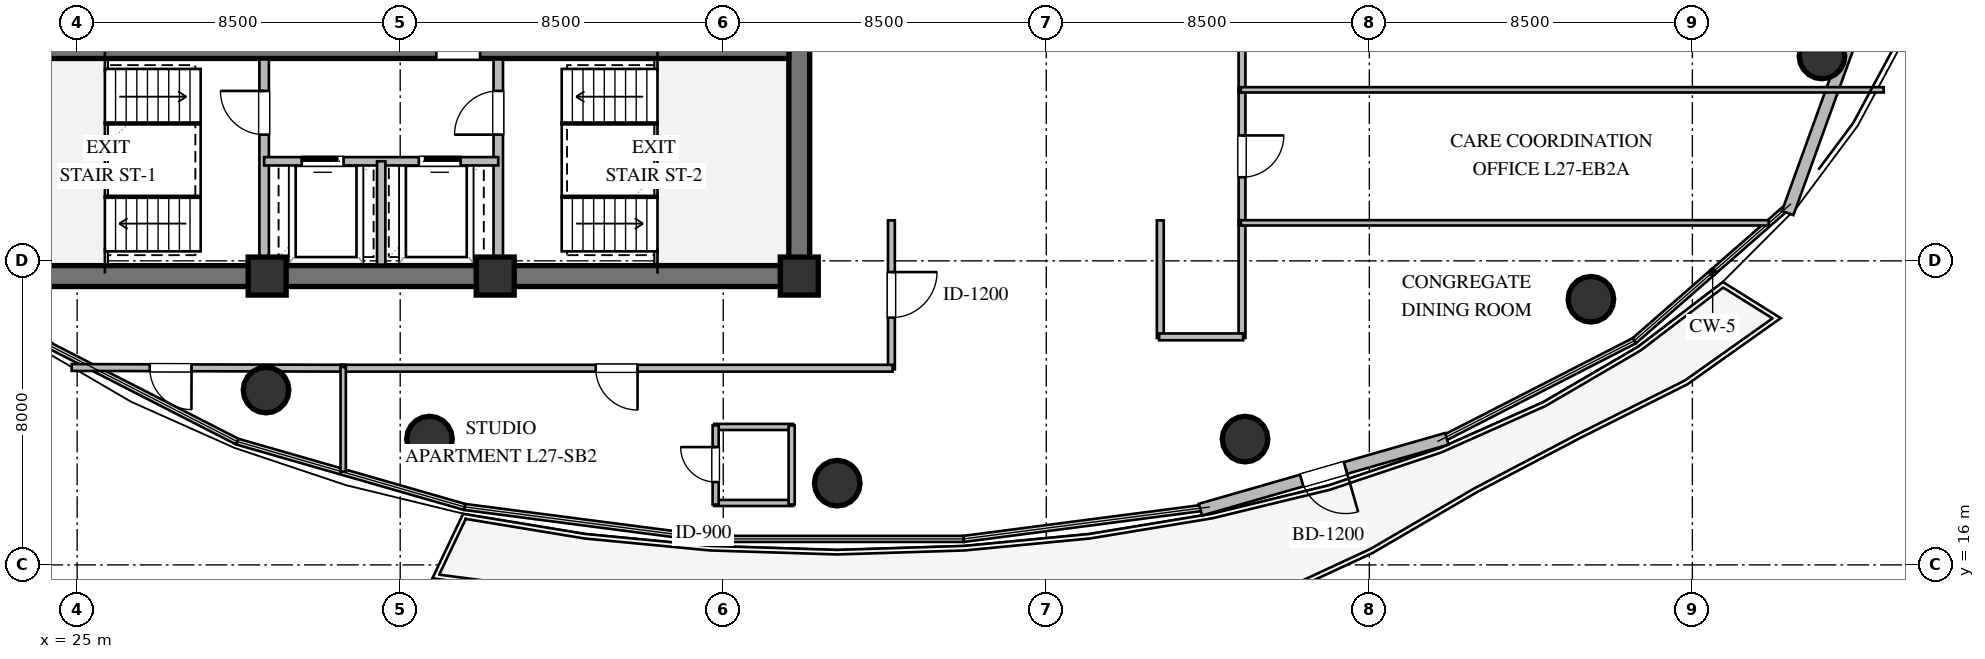
"""IFC4 building model, lengths in metres.
Left out: names, types, materials, properties, quantities, classifications, styles, units other than length and angle.
Written with IfcOpenShell. Run it as: python <this file> out.ifc"""

import sys

from ifc_helpers import new_model, si_unit, direction, frame, frame_2d, origin, origin_2d, place, context, subcontext, project, spatial, rectangle, circle, extrude, element, fill, save


model = new_model("IFC4")
c1 = context("Model", 3, precision=1e-05, world=origin(), true_north=direction((0.0, 1.0)))
c2 = subcontext(c1, "Body", "Model", "MODEL_VIEW")
j1 = project(units=[si_unit("LENGTHUNIT", "METRE"), si_unit("PLANEANGLEUNIT", "RADIAN")], contexts=[c1])
p1 = place(None, origin())
s1 = spatial("IfcSite", under=j1, at=p1, CompositionType="ELEMENT")
p2 = place(p1, origin())
s2 = spatial("IfcBuilding", under=s1, at=p2, CompositionType="ELEMENT")
p3 = place(p2, frame((0.0, 0.0, 106.2)))
s3 = spatial("IfcBuildingStorey", under=s2, at=p3, CompositionType="ELEMENT", Elevation=106.2)
p4 = place(p3, frame((21.725, 23.6, 0.0), z_axis=(0.0, 0.0, 1.0), x_axis=(1.0, 0.0, 0.0)))
e1 = element("IfcWall", 1, at=p4, inside=s3, PredefinedType="SHEAR", context=c2, shape_type="SweptSolid", body=[
    extrude(rectangle(XDim=22.55, YDim=0.55, at=frame_2d((11.275, 0.0))), origin(), (0.0, 0.0, 1.0), 3.36),
])
p5 = place(p3, frame((44.0, 23.875, 0.0), z_axis=(0.0, 0.0, 1.0), x_axis=(0.0, 1.0, 0.0)))
e2 = element("IfcWall", 2, at=p5, inside=s3, PredefinedType="SHEAR", context=c2, shape_type="SweptSolid", body=[
    extrude(rectangle(XDim=12.25, YDim=0.55, at=frame_2d((6.125, 0.0))), origin(), (0.0, 0.0, 1.0), 3.36),
])
p6 = place(p5, frame((8.725, 0.0, 0.0)))
e3 = element("IfcOpeningElement", 3, at=p6, cuts=e2, PredefinedType="OPENING", context=c2, shape_type="SweptSolid", body=[
    extrude(rectangle(XDim=1.5, YDim=2.15, at=frame_2d((0.75, 1.075))), frame((0.0, 0.285, 0.0), z_axis=(0.0, -1.0, 0.0), x_axis=(1.0, 0.0, 0.0)), (0.0, 0.0, 1.0), 0.57),
])
p7 = place(p3, frame((22.275, 29.6, 0.0), z_axis=(0.0, 0.0, 1.0), x_axis=(1.0, 0.0, 0.0)))
e4 = element("IfcWall", 4, at=p7, inside=s3, PredefinedType="SHEAR", context=c2, shape_type="SweptSolid", body=[
    extrude(rectangle(XDim=21.45, YDim=0.55, at=frame_2d((10.725, 0.0))), origin(), (0.0, 0.0, 1.0), 3.36),
])
p8 = place(p7, frame((12.175, 0.0, 0.0)))
e5 = element("IfcOpeningElement", 5, at=p8, cuts=e4, PredefinedType="OPENING", context=c2, shape_type="SweptSolid", body=[
    extrude(rectangle(XDim=1.15, YDim=2.1, at=frame_2d((0.575, 1.05))), frame((0.0, 0.285, 0.0), z_axis=(0.0, -1.0, 0.0), x_axis=(1.0, 0.0, 0.0)), (0.0, 0.0, 1.0), 0.57),
])
for number, where, z_axis, x_axis in (
    (6, (30.0, 23.6, 0.0), (0.0, 0.0, 1.0), (1.0, 0.0, 0.0)),
    (7, (36.0, 23.6, 0.0), (0.0, 0.0, 1.0), (1.0, 0.0, 0.0)),
    (8, (44.0, 23.6, 0.0), (0.0, 0.0, 1.0), (1.0, 0.0, 0.0)),
):
    element("IfcColumn", number, at=place(p3, frame(where, z_axis=z_axis, x_axis=x_axis)), inside=s3, PredefinedType="COLUMN", context=c2, shape_type="SweptSolid", body=[
        extrude(rectangle(XDim=1.0, YDim=1.0, at=origin_2d()), origin(), (0.0, 0.0, 1.0), 3.6),
    ])
for number, where, z_axis, x_axis in (
    (9, (29.97, 20.6, 0.0), (0.0, 0.0, 1.0), (1.0, 0.0, 0.0)),
    (10, (34.27, 19.31, 0.0), (0.0, 0.0, 1.0), (1.0, 0.0, 0.0)),
    (11, (45.0, 18.15, 0.0), (0.0, 0.0, 1.0), (1.0, 0.0, 0.0)),
    (12, (55.73, 19.31, 0.0), (0.0, 0.0, 1.0), (1.0, 0.0, 0.0)),
    (13, (64.83, 22.99, 0.0), (0.0, 0.0, 1.0), (1.0, 0.0, 0.0)),
    (14, (70.91, 29.39, 0.0), (0.0, 0.0, 1.0), (1.0, 0.0, 0.0)),
):
    element("IfcColumn", number, at=place(p3, frame(where, z_axis=z_axis, x_axis=x_axis)), inside=s3, PredefinedType="COLUMN", context=c2, shape_type="SweptSolid", body=[
        extrude(circle(Radius=0.6, at=origin_2d()), origin(), (0.0, 0.0, 1.0), 3.6),
    ])
p9 = place(p3, frame((74.708, 38.244, 0.0), z_axis=(0.0, 0.0, 1.0), x_axis=(-0.340324669139, -0.94030799187, 0.0)))
e15 = element("IfcWall", 15, at=p9, inside=s3, PredefinedType="STANDARD", context=c2, shape_type="SweptSolid", body=[
    extrude(rectangle(XDim=13.81, YDim=0.32, at=frame_2d((6.905, 0.0))), origin(), (0.0, 0.0, 1.0), 3.36),
])
p10 = place(p3, frame((61.039, 19.317, 0.0), z_axis=(0.0, 0.0, 1.0), x_axis=(-0.96106509915, -0.276322049784, 0.0)))
e16 = element("IfcWall", 16, at=p10, inside=s3, PredefinedType="STANDARD", context=c2, shape_type="SweptSolid", body=[
    extrude(rectangle(XDim=6.746, YDim=0.32, at=frame_2d((3.373, 0.0))), origin(), (0.0, 0.0, 1.0), 3.36),
])
p11 = place(p10, frame((2.773, 0.0, 0.0)))
e17 = element("IfcOpeningElement", 17, at=p11, cuts=e16, PredefinedType="OPENING", context=c2, shape_type="SweptSolid", body=[
    extrude(rectangle(XDim=1.2, YDim=2.15, at=frame_2d((0.6, 1.075))), frame((0.0, 0.17, 0.0), z_axis=(0.0, -1.0, 0.0), x_axis=(1.0, 0.0, 0.0)), (0.0, 0.0, 1.0), 0.34),
])
p12 = place(p3, frame((29.92, 23.9, 0.0), z_axis=(0.0, 0.0, 1.0), x_axis=(0.0, 1.0, 0.0)))
e18 = element("IfcWall", 18, at=p12, inside=s3, PredefinedType="SOLIDWALL", context=c2, shape_type="SweptSolid", body=[
    extrude(rectangle(XDim=5.4, YDim=0.25, at=frame_2d((2.7, 0.0))), origin(), (0.0, 0.0, 1.0), 2.89),
])
p13 = place(p12, frame((3.421, 0.0, 0.0)))
e19 = element("IfcOpeningElement", 19, at=p13, cuts=e18, PredefinedType="OPENING", context=c2, shape_type="SweptSolid", body=[
    extrude(rectangle(XDim=1.15, YDim=2.1, at=frame_2d((0.575, 1.05))), frame((0.0, 0.135, 0.0), z_axis=(0.0, -1.0, 0.0), x_axis=(1.0, 0.0, 0.0)), (0.0, 0.0, 1.0), 0.27),
])
p14 = place(p3, frame((36.08, 23.9, 0.0), z_axis=(0.0, 0.0, 1.0), x_axis=(0.0, 1.0, 0.0)))
e20 = element("IfcWall", 20, at=p14, inside=s3, PredefinedType="SOLIDWALL", context=c2, shape_type="SweptSolid", body=[
    extrude(rectangle(XDim=5.4, YDim=0.25, at=frame_2d((2.7, 0.0))), origin(), (0.0, 0.0, 1.0), 3.36),
])
p15 = place(p14, frame((3.421, 0.0, 0.0)))
e21 = element("IfcOpeningElement", 21, at=p15, cuts=e20, PredefinedType="OPENING", context=c2, shape_type="SweptSolid", body=[
    extrude(rectangle(XDim=1.15, YDim=2.1, at=frame_2d((0.575, 1.05))), frame((0.0, 0.135, 0.0), z_axis=(0.0, -1.0, 0.0), x_axis=(1.0, 0.0, 0.0)), (0.0, 0.0, 1.0), 0.27),
])
p16 = place(p3, frame((29.92, 26.62, 0.0), z_axis=(0.0, 0.0, 1.0), x_axis=(1.0, 0.0, 0.0)))
e22 = element("IfcWall", 22, at=p16, inside=s3, PredefinedType="SOLIDWALL", context=c2, shape_type="SweptSolid", body=[
    extrude(rectangle(XDim=6.16, YDim=0.22, at=frame_2d((3.08, 0.0))), origin(), (0.0, 0.0, 1.0), 3.36),
])
p17 = place(p16, frame((0.99, 0.0, 0.0)))
e23 = element("IfcOpeningElement", 23, at=p17, cuts=e22, PredefinedType="OPENING", context=c2, shape_type="SweptSolid", body=[
    extrude(rectangle(XDim=1.1, YDim=2.1, at=frame_2d((0.55, 1.05))), frame((0.0, 0.12, 0.0), z_axis=(0.0, -1.0, 0.0), x_axis=(1.0, 0.0, 0.0)), (0.0, 0.0, 1.0), 0.24),
])
p18 = place(p16, frame((4.07, 0.0, 0.0)))
e24 = element("IfcOpeningElement", 24, at=p18, cuts=e22, PredefinedType="OPENING", context=c2, shape_type="SweptSolid", body=[
    extrude(rectangle(XDim=1.1, YDim=2.1, at=frame_2d((0.55, 1.05))), frame((0.0, 0.12, 0.0), z_axis=(0.0, -1.0, 0.0), x_axis=(1.0, 0.0, 0.0)), (0.0, 0.0, 1.0), 0.24),
])
p19 = place(p3, frame((33.0, 23.9, 0.0), z_axis=(0.0, 0.0, 1.0), x_axis=(0.0, 1.0, 0.0)))
e25 = element("IfcWall", 25, at=p19, inside=s3, PredefinedType="SOLIDWALL", context=c2, shape_type="SweptSolid", body=[
    extrude(rectangle(XDim=2.72, YDim=0.22, at=frame_2d((1.36, 0.0))), origin(), (0.0, 0.0, 1.0), 3.36),
])
p20 = place(p3, frame((41.76, 17.63, 0.0), z_axis=(0.0, 0.0, 1.0), x_axis=(1.0, 0.0, 0.0)))
e26 = element("IfcWall", 26, at=p20, inside=s3, PredefinedType="PLUMBINGWALL", context=c2, shape_type="SweptSolid", body=[
    extrude(rectangle(XDim=2.08, YDim=0.16, at=frame_2d((1.04, 0.0))), origin(), (0.0, 0.0, 1.0), 2.657),
])
p21 = place(p3, frame((41.76, 19.63, 0.0), z_axis=(0.0, 0.0, 1.0), x_axis=(1.0, 0.0, 0.0)))
e27 = element("IfcWall", 27, at=p21, inside=s3, PredefinedType="PLUMBINGWALL", context=c2, shape_type="SweptSolid", body=[
    extrude(rectangle(XDim=2.08, YDim=0.16, at=frame_2d((1.04, 0.0))), origin(), (0.0, 0.0, 1.0), 3.36),
])
p22 = place(p3, frame((41.8, 17.59, 0.0), z_axis=(0.0, 0.0, 1.0), x_axis=(0.0, 1.0, 0.0)))
e28 = element("IfcWall", 28, at=p22, inside=s3, PredefinedType="PLUMBINGWALL", context=c2, shape_type="SweptSolid", body=[
    extrude(rectangle(XDim=2.08, YDim=0.16, at=frame_2d((1.04, 0.0))), origin(), (0.0, 0.0, 1.0), 3.36),
])
p23 = place(p22, frame((0.59, 0.0, 0.0)))
e29 = element("IfcOpeningElement", 29, at=p23, cuts=e28, PredefinedType="OPENING", context=c2, shape_type="SweptSolid", body=[
    extrude(rectangle(XDim=0.92, YDim=2.1, at=frame_2d((0.46, 1.05))), frame((0.0, 0.09, 0.0), z_axis=(0.0, -1.0, 0.0), x_axis=(1.0, 0.0, 0.0)), (0.0, 0.0, 1.0), 0.18),
])
p24 = place(p3, frame((43.8, 17.59, 0.0), z_axis=(0.0, 0.0, 1.0), x_axis=(0.0, 1.0, 0.0)))
e30 = element("IfcWall", 30, at=p24, inside=s3, PredefinedType="PLUMBINGWALL", context=c2, shape_type="SweptSolid", body=[
    extrude(rectangle(XDim=2.08, YDim=0.16, at=frame_2d((1.04, 0.0))), origin(), (0.0, 0.0, 1.0), 3.36),
])
p25 = place(p3, frame((46.425, 25.065, 0.0), z_axis=(0.0, 0.0, 1.0), x_axis=(0.0, -1.0, 0.0)))
e31 = element("IfcWall", 31, at=p25, inside=s3, PredefinedType="PARTITIONING", context=c2, shape_type="SweptSolid", body=[
    extrude(rectangle(XDim=3.92, YDim=0.18, at=frame_2d((1.96, 0.0))), origin(), (0.0, 0.0, 1.0), 3.36),
])
p26 = place(p25, frame((1.36, 0.0, 0.0)))
e32 = element("IfcOpeningElement", 32, at=p26, cuts=e31, PredefinedType="OPENING", context=c2, shape_type="SweptSolid", body=[
    extrude(rectangle(XDim=1.2, YDim=2.15, at=frame_2d((0.6, 1.075))), frame((0.0, 0.1, 0.0), z_axis=(0.0, -1.0, 0.0), x_axis=(1.0, 0.0, 0.0)), (0.0, 0.0, 1.0), 0.2),
])
for number, where, z_axis, x_axis in (
    (33, (55.65, 25.065, 0.0), (0.0, 0.0, 1.0), (0.0, -1.0, 0.0)),
    (34, (53.5, 21.97, 0.0), (0.0, 0.0, 1.0), (0.0, 1.0, 0.0)),
):
    element("IfcWall", number, at=place(p3, frame(where, z_axis=z_axis, x_axis=x_axis)), inside=s3, PredefinedType="PARTITIONING", context=c2, shape_type="SweptSolid", body=[
        extrude(rectangle(XDim=3.095, YDim=0.18, at=frame_2d((1.547, 0.0))), origin(), (0.0, 0.0, 1.0), 3.36),
    ])
p27 = place(p3, frame((55.68, 22.0, 0.0), z_axis=(0.0, 0.0, 1.0), x_axis=(-1.0, 0.0, 0.0)))
e35 = element("IfcWall", 35, at=p27, inside=s3, PredefinedType="PARTITIONING", context=c2, shape_type="SweptSolid", body=[
    extrude(rectangle(XDim=2.21, YDim=0.18, at=frame_2d((1.105, 0.0))), origin(), (0.0, 0.0, 1.0), 3.36),
])
p28 = place(p3, frame((55.65, 28.565, 0.0), z_axis=(0.0, 0.0, 1.0), x_axis=(0.0, -1.0, 0.0)))
e36 = element("IfcWall", 36, at=p28, inside=s3, PredefinedType="PARTITIONING", context=c2, shape_type="SweptSolid", body=[
    extrude(rectangle(XDim=3.63, YDim=0.18, at=frame_2d((1.815, 0.0))), origin(), (0.0, 0.0, 1.0), 3.36),
])
p29 = place(p28, frame((1.265, 0.0, 0.0)))
e37 = element("IfcOpeningElement", 37, at=p29, cuts=e36, PredefinedType="OPENING", context=c2, shape_type="SweptSolid", body=[
    extrude(rectangle(XDim=1.1, YDim=2.1, at=frame_2d((0.55, 1.05))), frame((0.0, 0.1, 0.0), z_axis=(0.0, -1.0, 0.0), x_axis=(1.0, 0.0, 0.0)), (0.0, 0.0, 1.0), 0.2),
])
p30 = place(p3, frame((55.65, 32.065, 0.0), z_axis=(0.0, 0.0, 1.0), x_axis=(0.0, -1.0, 0.0)))
e38 = element("IfcWall", 38, at=p30, inside=s3, PredefinedType="PARTITIONING", context=c2, shape_type="SweptSolid", body=[
    extrude(rectangle(XDim=3.63, YDim=0.18, at=frame_2d((1.815, 0.0))), origin(), (0.0, 0.0, 1.0), 3.36),
])
p31 = place(p30, frame((1.265, 0.0, 0.0)))
e39 = element("IfcOpeningElement", 39, at=p31, cuts=e38, PredefinedType="OPENING", context=c2, shape_type="SweptSolid", body=[
    extrude(rectangle(XDim=1.1, YDim=2.1, at=frame_2d((0.55, 1.05))), frame((0.0, 0.1, 0.0), z_axis=(0.0, -1.0, 0.0), x_axis=(1.0, 0.0, 0.0)), (0.0, 0.0, 1.0), 0.2),
])
p32 = place(p3, frame((32.065, 21.175, 0.0), z_axis=(0.0, 0.0, 1.0), x_axis=(-0.999996512042, 0.002641193551, 0.0)))
e40 = element("IfcWall", 40, at=p32, inside=s3, PredefinedType="PARTITIONING", context=c2, shape_type="SweptSolid", body=[
    extrude(rectangle(XDim=7.21, YDim=0.18, at=frame_2d((3.605, 0.0))), origin(), (0.0, 0.0, 1.0), 2.657),
])
p33 = place(p32, frame((4.055, 0.0, 0.0)))
e41 = element("IfcOpeningElement", 41, at=p33, cuts=e40, PredefinedType="OPENING", context=c2, shape_type="SweptSolid", body=[
    extrude(rectangle(XDim=1.1, YDim=2.1, at=frame_2d((0.55, 1.05))), frame((0.0, 0.1, 0.0), z_axis=(0.0, -1.0, 0.0), x_axis=(1.0, 0.0, 0.0)), (0.0, 0.0, 1.0), 0.2),
])
p34 = place(p3, frame((46.455, 21.175, 0.0), z_axis=(0.0, 0.0, 1.0), x_axis=(-1.0, 0.0, 0.0)))
e42 = element("IfcWall", 42, at=p34, inside=s3, PredefinedType="PARTITIONING", context=c2, shape_type="SweptSolid", body=[
    extrude(rectangle(XDim=14.52, YDim=0.18, at=frame_2d((7.26, 0.0))), origin(), (0.0, 0.0, 1.0), 2.996),
])
p35 = place(p34, frame((6.71, 0.0, 0.0)))
e43 = element("IfcOpeningElement", 43, at=p35, cuts=e42, PredefinedType="OPENING", context=c2, shape_type="SweptSolid", body=[
    extrude(rectangle(XDim=1.1, YDim=2.1, at=frame_2d((0.55, 1.05))), frame((0.0, 0.1, 0.0), z_axis=(0.0, -1.0, 0.0), x_axis=(1.0, 0.0, 0.0)), (0.0, 0.0, 1.0), 0.2),
])
p36 = place(p3, frame((55.62, 25.0, 0.0), z_axis=(0.0, 0.0, 1.0), x_axis=(1.0, 0.0, 0.0)))
e44 = element("IfcWall", 44, at=p36, inside=s3, PredefinedType="PARTITIONING", context=c2, shape_type="SweptSolid", body=[
    extrude(rectangle(XDim=13.891, YDim=0.14, at=frame_2d((6.946, 0.0))), origin(), (0.0, 0.0, 1.0), 3.36),
])
p37 = place(p3, frame((55.62, 28.5, 0.0), z_axis=(0.0, 0.0, 1.0), x_axis=(1.0, 0.0, 0.0)))
e45 = element("IfcWall", 45, at=p37, inside=s3, PredefinedType="PARTITIONING", context=c2, shape_type="SweptSolid", body=[
    extrude(rectangle(XDim=16.915, YDim=0.14, at=frame_2d((8.458, 0.0))), origin(), (0.0, 0.0, 1.0), 2.89),
])
p38 = place(p3, frame((32.0, 21.205, 0.0), z_axis=(0.0, 0.0, 1.0), x_axis=(0.0, -1.0, 0.0)))
e46 = element("IfcWall", 46, at=p38, inside=s3, PredefinedType="PARTITIONING", context=c2, shape_type="SweptSolid", body=[
    extrude(rectangle(XDim=2.752, YDim=0.14, at=frame_2d((1.376, 0.0))), origin(), (0.0, 0.0, 1.0), 3.36),
])
p39 = place(p11, origin())
e47 = element("IfcDoor", 47, at=p39, inside=s3, OperationType="SINGLE_SWING_LEFT", PredefinedType="DOOR", context=c2, shape_type="SweptSolid", body=[
    extrude(rectangle(XDim=1.2, YDim=2.15, at=frame_2d((0.6, 1.075))), frame((0.0, 0.025, 0.0), z_axis=(0.0, -1.0, 0.0), x_axis=(1.0, 0.0, 0.0)), (0.0, 0.0, 1.0), 0.05),
])
fill(e17, e47)
p40 = place(p13, origin())
e48 = element("IfcDoor", 48, at=p40, inside=s3, OperationType="SINGLE_SWING_RIGHT", PredefinedType="DOOR", context=c2, shape_type="SweptSolid", body=[
    extrude(rectangle(XDim=1.15, YDim=2.1, at=frame_2d((0.575, 1.05))), frame((0.0, 0.025, 0.0), z_axis=(0.0, -1.0, 0.0), x_axis=(1.0, 0.0, 0.0)), (0.0, 0.0, 1.0), 0.05),
])
fill(e19, e48)
p41 = place(p15, origin())
e49 = element("IfcDoor", 49, at=p41, inside=s3, OperationType="SINGLE_SWING_LEFT", PredefinedType="DOOR", context=c2, shape_type="SweptSolid", body=[
    extrude(rectangle(XDim=1.15, YDim=2.1, at=frame_2d((0.575, 1.05))), frame((0.0, 0.025, 0.0), z_axis=(0.0, -1.0, 0.0), x_axis=(1.0, 0.0, 0.0)), (0.0, 0.0, 1.0), 0.05),
])
fill(e21, e49)
p42 = place(p17, origin())
e50 = element("IfcDoor", 50, at=p42, inside=s3, OperationType="SLIDING_TO_LEFT", PredefinedType="DOOR", context=c2, shape_type="SweptSolid", body=[
    extrude(rectangle(XDim=1.1, YDim=2.1, at=frame_2d((0.55, 1.05))), frame((0.0, 0.025, 0.0), z_axis=(0.0, -1.0, 0.0), x_axis=(1.0, 0.0, 0.0)), (0.0, 0.0, 1.0), 0.05),
])
fill(e23, e50)
p43 = place(p18, origin())
e51 = element("IfcDoor", 51, at=p43, inside=s3, OperationType="SLIDING_TO_RIGHT", PredefinedType="DOOR", context=c2, shape_type="SweptSolid", body=[
    extrude(rectangle(XDim=1.1, YDim=2.1, at=frame_2d((0.55, 1.05))), frame((0.0, 0.025, 0.0), z_axis=(0.0, -1.0, 0.0), x_axis=(1.0, 0.0, 0.0)), (0.0, 0.0, 1.0), 0.05),
])
fill(e24, e51)
p44 = place(p23, origin())
e52 = element("IfcDoor", 52, at=p44, inside=s3, OperationType="SINGLE_SWING_RIGHT", PredefinedType="DOOR", context=c2, shape_type="SweptSolid", body=[
    extrude(rectangle(XDim=0.92, YDim=2.1, at=frame_2d((0.46, 1.05))), frame((0.0, 0.025, 0.0), z_axis=(0.0, -1.0, 0.0), x_axis=(1.0, 0.0, 0.0)), (0.0, 0.0, 1.0), 0.05),
])
fill(e29, e52)
p45 = place(p26, origin())
e53 = element("IfcDoor", 53, at=p45, inside=s3, OperationType="SINGLE_SWING_LEFT", PredefinedType="DOOR", context=c2, shape_type="SweptSolid", body=[
    extrude(rectangle(XDim=1.2, YDim=2.15, at=frame_2d((0.6, 1.075))), frame((0.0, 0.025, 0.0), z_axis=(0.0, -1.0, 0.0), x_axis=(1.0, 0.0, 0.0)), (0.0, 0.0, 1.0), 0.05),
])
fill(e32, e53)
p46 = place(p29, origin())
e54 = element("IfcDoor", 54, at=p46, inside=s3, OperationType="SINGLE_SWING_LEFT", PredefinedType="DOOR", context=c2, shape_type="SweptSolid", body=[
    extrude(rectangle(XDim=1.1, YDim=2.1, at=frame_2d((0.55, 1.05))), frame((0.0, 0.025, 0.0), z_axis=(0.0, -1.0, 0.0), x_axis=(1.0, 0.0, 0.0)), (0.0, 0.0, 1.0), 0.05),
])
fill(e37, e54)
p47 = place(p33, origin())
e55 = element("IfcDoor", 55, at=p47, inside=s3, OperationType="SINGLE_SWING_LEFT", PredefinedType="DOOR", context=c2, shape_type="SweptSolid", body=[
    extrude(rectangle(XDim=1.1, YDim=2.1, at=frame_2d((0.55, 1.05))), frame((0.0, 0.025, 0.0), z_axis=(0.0, -1.0, 0.0), x_axis=(1.0, 0.0, 0.0)), (0.0, 0.0, 1.0), 0.05),
])
fill(e41, e55)
p48 = place(p35, origin())
e56 = element("IfcDoor", 56, at=p48, inside=s3, OperationType="SINGLE_SWING_LEFT", PredefinedType="DOOR", context=c2, shape_type="SweptSolid", body=[
    extrude(rectangle(XDim=1.1, YDim=2.1, at=frame_2d((0.55, 1.05))), frame((0.0, 0.025, 0.0), z_axis=(0.0, -1.0, 0.0), x_axis=(1.0, 0.0, 0.0)), (0.0, 0.0, 1.0), 0.05),
])
fill(e43, e56)
save(model, sys.argv[1])
